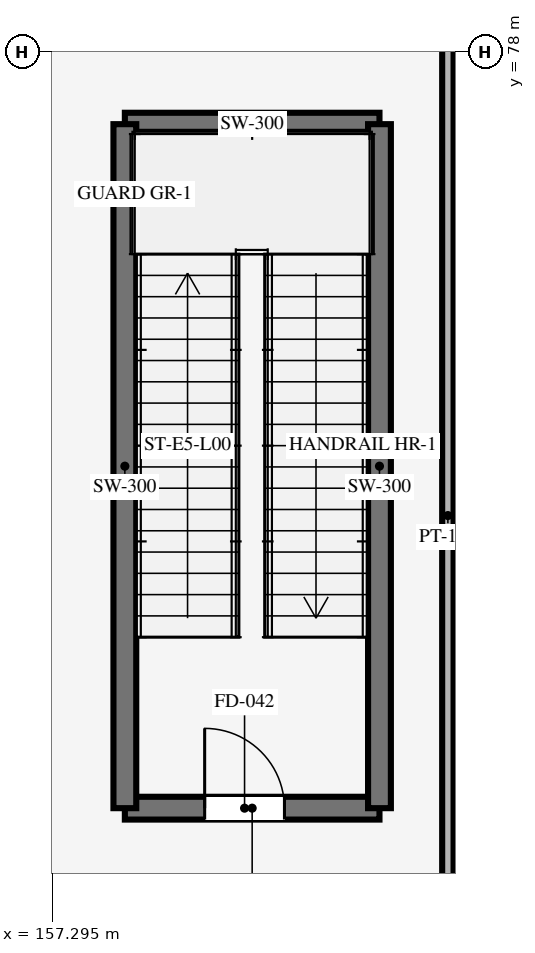
"""IFC4 building model, lengths in metres.
Left out: names, types, materials, properties, quantities, classifications, styles, units other than length and angle.
Written with IfcOpenShell. Run it as: python <this file> out.ifc"""

import sys

from ifc_helpers import new_model, si_unit, direction, frame, frame_2d, origin, place, context, subcontext, project, spatial, rectangle, extrude, element, fill, save


model = new_model("IFC4")
c1 = context("Model", 3, precision=1e-05, world=origin(), true_north=direction((0.0, 1.0)))
c2 = subcontext(c1, "Body", "Model", "MODEL_VIEW")
j1 = project(units=[si_unit("LENGTHUNIT", "METRE"), si_unit("PLANEANGLEUNIT", "RADIAN")], contexts=[c1])
p1 = place(None, origin())
s1 = spatial("IfcSite", under=j1, at=p1, CompositionType="ELEMENT")
p2 = place(p1, origin())
s2 = spatial("IfcBuilding", under=s1, at=p2, CompositionType="ELEMENT")
p3 = place(p2, origin())
s3 = spatial("IfcBuildingStorey", under=s2, at=p3, CompositionType="ELEMENT", Elevation=0.0)
p4 = place(p3, frame((158.25, 68.05, 0.0), z_axis=(0.0, 0.0, 1.0), x_axis=(1.0, 0.0, 0.0)))
e1 = element("IfcWall", 1, at=p4, inside=s3, PredefinedType="SHEAR", context=c2, shape_type="SweptSolid", body=[
    extrude(rectangle(XDim=3.35, YDim=0.3, at=frame_2d((1.675, 0.0))), origin(), (0.0, 0.0, 1.0), 5.38),
])
p5 = place(p4, frame((1.05, 0.0, 0.0)))
e2 = element("IfcOpeningElement", 2, at=p5, cuts=e1, PredefinedType="OPENING", context=c2, shape_type="SweptSolid", body=[
    extrude(rectangle(XDim=1.05, YDim=2.15, at=frame_2d((0.525, 1.075))), frame((0.0, 0.16, 0.0), z_axis=(0.0, -1.0, 0.0), x_axis=(1.0, 0.0, 0.0)), (0.0, 0.0, 1.0), 0.32),
])
p6 = place(p3, frame((158.25, 77.05, 0.0), z_axis=(0.0, 0.0, 1.0), x_axis=(1.0, 0.0, 0.0)))
e3 = element("IfcWall", 3, at=p6, inside=s3, PredefinedType="SHEAR", context=c2, shape_type="SweptSolid", body=[
    extrude(rectangle(XDim=3.35, YDim=0.3, at=frame_2d((1.675, 0.0))), origin(), (0.0, 0.0, 1.0), 5.38),
])
for number, where, z_axis, x_axis in (
    (4, (158.25, 68.05, 0.0), (0.0, 0.0, 1.0), (0.0, 1.0, 0.0)),
    (5, (161.6, 68.05, 0.0), (0.0, 0.0, 1.0), (0.0, 1.0, 0.0)),
):
    element("IfcWall", number, at=place(p3, frame(where, z_axis=z_axis, x_axis=x_axis)), inside=s3, PredefinedType="SHEAR", context=c2, shape_type="SweptSolid", body=[
        extrude(rectangle(XDim=9.0, YDim=0.3, at=frame_2d((4.5, 0.0))), origin(), (0.0, 0.0, 1.0), 5.38),
    ])
p7 = place(p3, frame((162.5, 54.4, 0.0), z_axis=(0.0, 0.0, 1.0), x_axis=(0.0, 1.0, 0.0)))
e6 = element("IfcWall", 6, at=p7, inside=s3, PredefinedType="PARTITIONING", context=c2, shape_type="SweptSolid", body=[
    extrude(rectangle(XDim=35.0, YDim=0.15, at=frame_2d((17.5, 0.0))), origin(), (0.0, 0.0, 1.0), 4.2),
])
p8 = place(p5, origin())
e7 = element("IfcDoor", 7, at=p8, inside=s3, OperationType="SINGLE_SWING_LEFT", PredefinedType="DOOR", context=c2, shape_type="SweptSolid", body=[
    extrude(rectangle(XDim=1.05, YDim=2.15, at=frame_2d((0.525, 1.075))), frame((0.0, 0.025, 0.0), z_axis=(0.0, -1.0, 0.0), x_axis=(1.0, 0.0, 0.0)), (0.0, 0.0, 1.0), 0.05),
])
fill(e2, e7)
save(model, sys.argv[1])
